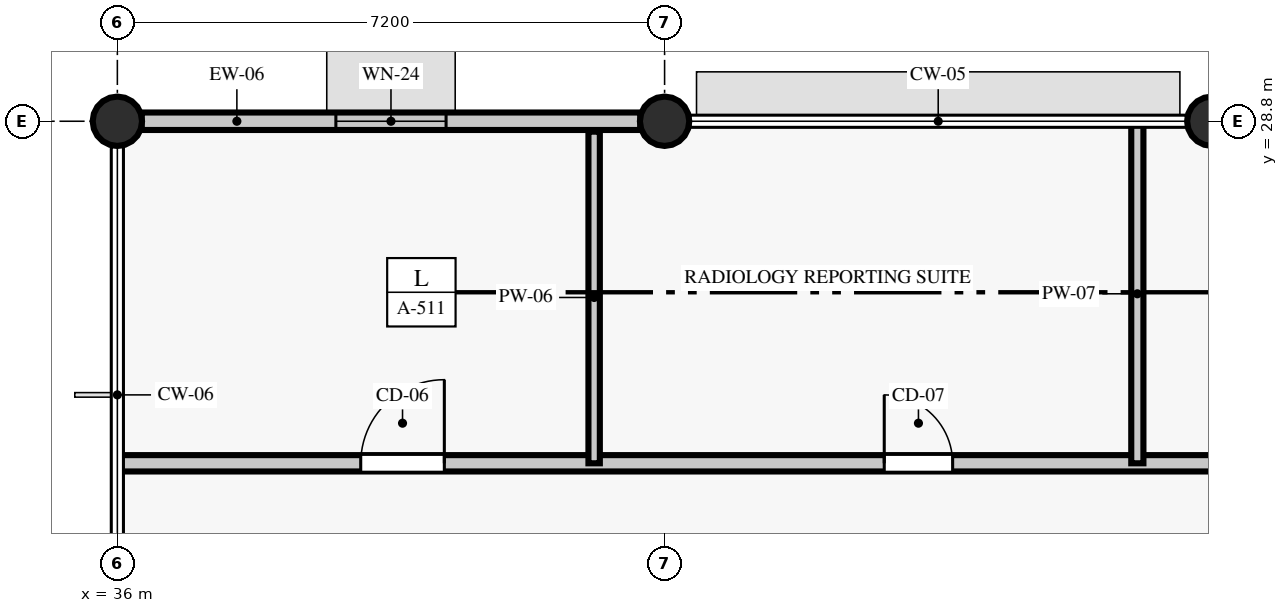
"""IFC4 building model, lengths in metres.
Left out: names, types, materials, properties, quantities, classifications, styles, units other than length and angle.
Written with IfcOpenShell. Run it as: python <this file> out.ifc"""

import sys

from ifc_helpers import new_model, si_unit, direction, frame, frame_2d, origin, origin_2d, place, context, subcontext, project, spatial, rectangle, circle, extrude, element, fill, save


model = new_model("IFC4")
c1 = context("Model", 3, precision=1e-05, world=origin(), true_north=direction((0.0, 1.0)))
c2 = subcontext(c1, "Body", "Model", "MODEL_VIEW")
j1 = project(units=[si_unit("LENGTHUNIT", "METRE"), si_unit("PLANEANGLEUNIT", "RADIAN")], contexts=[c1])
p1 = place(None, origin())
s1 = spatial("IfcSite", under=j1, at=p1, CompositionType="ELEMENT")
p2 = place(p1, origin())
s2 = spatial("IfcBuilding", under=s1, at=p2, CompositionType="ELEMENT")
p3 = place(p2, frame((0.0, 0.0, 4.8)))
s3 = spatial("IfcBuildingStorey", under=s2, at=p3, CompositionType="ELEMENT", Elevation=4.8)
p4 = place(p3, frame((36.0, 28.8, 0.0), z_axis=(0.0, 0.0, 1.0), x_axis=(1.0, 0.0, 0.0)))
e1 = element("IfcColumn", 1, at=p4, inside=s3, PredefinedType="COLUMN", context=c2, shape_type="SweptSolid", body=[
    extrude(circle(Radius=0.325, at=origin_2d()), origin(), (0.0, 0.0, 1.0), 4.548),
])
for number, where, z_axis, x_axis in (
    (2, (43.2, 28.8, 0.0), (0.0, 0.0, 1.0), (1.0, 0.0, 0.0)),
    (3, (50.4, 28.8, 0.0), (0.0, 0.0, 1.0), (1.0, 0.0, 0.0)),
):
    element("IfcColumn", number, at=place(p3, frame(where, z_axis=z_axis, x_axis=x_axis)), inside=s3, PredefinedType="COLUMN", context=c2, shape_type="SweptSolid", body=[
        extrude(circle(Radius=0.325, at=origin_2d()), origin(), (0.0, 0.0, 1.0), 4.505),
    ])
p5 = place(p3, frame((42.88, 28.8, 0.0), z_axis=(0.0, 0.0, 1.0), x_axis=(-1.0, 0.0, 0.0)))
e4 = element("IfcWall", 4, at=p5, inside=s3, PredefinedType="STANDARD", context=c2, shape_type="SweptSolid", body=[
    extrude(rectangle(XDim=6.56, YDim=0.23, at=frame_2d((3.28, 0.0))), origin(), (0.0, 0.0, 1.0), 3.898),
])
p6 = place(p5, frame((2.555, 0.0, 0.9)))
e5 = element("IfcOpeningElement", 5, at=p6, cuts=e4, PredefinedType="OPENING", context=c2, shape_type="SweptSolid", body=[
    extrude(rectangle(XDim=1.45, YDim=1.54, at=frame_2d((0.725, 0.77))), frame((0.0, 0.125, 0.0), z_axis=(0.0, -1.0, 0.0), x_axis=(1.0, 0.0, 0.0)), (0.0, 0.0, 1.0), 0.25),
])
p7 = place(p3, frame((36.04, 24.3, 0.0), z_axis=(0.0, 0.0, 1.0), x_axis=(1.0, 0.0, 0.0)))
e6 = element("IfcWall", 6, at=p7, inside=s3, PredefinedType="PARTITIONING", context=c2, shape_type="SweptSolid", body=[
    extrude(rectangle(XDim=21.54, YDim=0.215, at=frame_2d((10.77, 0.0))), origin(), (0.0, 0.0, 1.0), 3.898),
])
p8 = place(p7, frame((3.162, 0.0, 0.0)))
e7 = element("IfcOpeningElement", 7, at=p8, cuts=e6, PredefinedType="OPENING", context=c2, shape_type="SweptSolid", body=[
    extrude(rectangle(XDim=1.1, YDim=2.08, at=frame_2d((0.55, 1.04))), frame((0.0, 0.117, 0.0), z_axis=(0.0, -1.0, 0.0), x_axis=(1.0, 0.0, 0.0)), (0.0, 0.0, 1.0), 0.235),
])
p9 = place(p7, frame((10.05, 0.0, 0.0)))
e8 = element("IfcOpeningElement", 8, at=p9, cuts=e6, PredefinedType="OPENING", context=c2, shape_type="SweptSolid", body=[
    extrude(rectangle(XDim=0.9, YDim=2.13, at=frame_2d((0.45, 1.065))), frame((0.0, 0.117, 0.0), z_axis=(0.0, -1.0, 0.0), x_axis=(1.0, 0.0, 0.0)), (0.0, 0.0, 1.0), 0.235),
])
p10 = place(p7, frame((17.805, 0.0, 0.0)))
e9 = element("IfcOpeningElement", 9, at=p10, cuts=e6, PredefinedType="OPENING", context=c2, shape_type="SweptSolid", body=[
    extrude(rectangle(XDim=0.95, YDim=2.13, at=frame_2d((0.475, 1.065))), frame((0.0, 0.117, 0.0), z_axis=(0.0, -1.0, 0.0), x_axis=(1.0, 0.0, 0.0)), (0.0, 0.0, 1.0), 0.235),
])
p11 = place(p3, frame((42.273, 24.3, 0.0), z_axis=(0.0, 0.0, 1.0), x_axis=(0.0, 1.0, 0.0)))
e10 = element("IfcWall", 10, at=p11, inside=s3, PredefinedType="PARTITIONING", context=c2, shape_type="SweptSolid", body=[
    extrude(rectangle(XDim=4.363, YDim=0.15, at=frame_2d((2.182, 0.0))), origin(), (0.0, 0.0, 1.0), 4.048),
])
p12 = place(p3, frame((49.42, 24.3, 0.0), z_axis=(0.0, 0.0, 1.0), x_axis=(0.0, 1.0, 0.0)))
e11 = element("IfcWall", 11, at=p12, inside=s3, PredefinedType="PARTITIONING", context=c2, shape_type="SweptSolid", body=[
    extrude(rectangle(XDim=4.46, YDim=0.16, at=frame_2d((2.23, 0.0))), origin(), (0.0, 0.0, 1.0), 3.855),
])
p13 = place(p6, origin())
e12 = element("IfcWindow", 12, at=p13, inside=s3, PartitioningType="SINGLE_PANEL", PredefinedType="WINDOW", context=c2, shape_type="SweptSolid", body=[
    extrude(rectangle(XDim=1.45, YDim=1.54, at=frame_2d((0.725, 0.77))), frame((0.0, 0.03, 0.0), z_axis=(0.0, -1.0, 0.0), x_axis=(1.0, 0.0, 0.0)), (0.0, 0.0, 1.0), 0.06),
])
fill(e5, e12)
p14 = place(p8, origin())
e13 = element("IfcDoor", 13, at=p14, inside=s3, OperationType="SINGLE_SWING_RIGHT", PredefinedType="DOOR", context=c2, shape_type="SweptSolid", body=[
    extrude(rectangle(XDim=1.1, YDim=2.08, at=frame_2d((0.55, 1.04))), frame((0.0, 0.025, 0.0), z_axis=(0.0, -1.0, 0.0), x_axis=(1.0, 0.0, 0.0)), (0.0, 0.0, 1.0), 0.05),
])
fill(e7, e13)
p15 = place(p9, origin())
e14 = element("IfcDoor", 14, at=p15, inside=s3, OperationType="SINGLE_SWING_LEFT", PredefinedType="DOOR", context=c2, shape_type="SweptSolid", body=[
    extrude(rectangle(XDim=0.9, YDim=2.13, at=frame_2d((0.45, 1.065))), frame((0.0, 0.025, 0.0), z_axis=(0.0, -1.0, 0.0), x_axis=(1.0, 0.0, 0.0)), (0.0, 0.0, 1.0), 0.05),
])
fill(e8, e14)
save(model, sys.argv[1])
